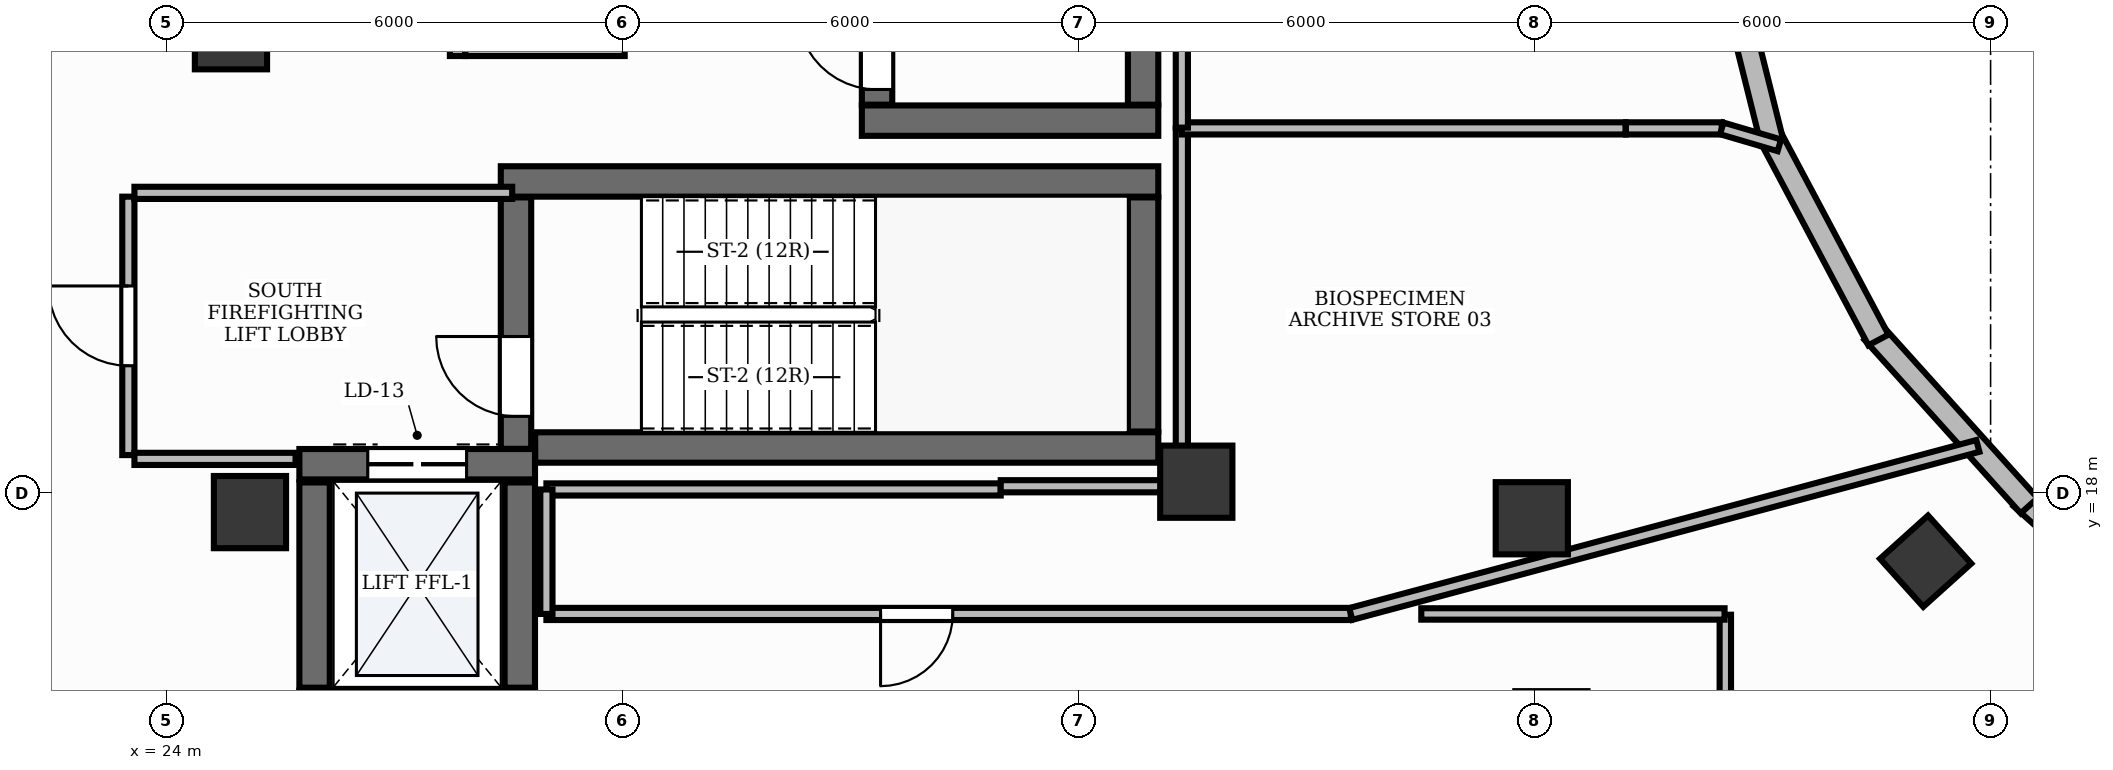
"""IFC4 building model, lengths in metres.
Left out: names, types, materials, properties, quantities, classifications, styles, units other than length and angle.
Written with IfcOpenShell. Run it as: python <this file> out.ifc"""

import sys

from ifc_helpers import new_model, si_unit, direction, frame, frame_2d, origin, origin_2d, place, context, subcontext, project, spatial, rectangle, extrude, element, fill, save


model = new_model("IFC4")
c1 = context("Model", 3, precision=1e-05, world=origin(), true_north=direction((0.0, 1.0)))
c2 = subcontext(c1, "Body", "Model", "MODEL_VIEW")
j1 = project(units=[si_unit("LENGTHUNIT", "METRE"), si_unit("PLANEANGLEUNIT", "RADIAN")], contexts=[c1])
p1 = place(None, origin())
s1 = spatial("IfcSite", under=j1, at=p1, CompositionType="ELEMENT")
p2 = place(p1, origin())
s2 = spatial("IfcBuilding", under=s1, at=p2, CompositionType="ELEMENT")
p3 = place(p2, frame((0.0, 0.0, 273.0)))
s3 = spatial("IfcBuildingStorey", under=s2, at=p3, CompositionType="ELEMENT", Elevation=273.0)
p4 = place(p3, frame((28.852, 18.6, 0.0), z_axis=(0.0, 0.0, 1.0), x_axis=(1.0, 0.0, 0.0)))
e1 = element("IfcWall", 1, at=p4, inside=s3, PredefinedType="SHEAR", context=c2, shape_type="SweptSolid", body=[
    extrude(rectangle(XDim=8.198, YDim=0.4, at=frame_2d((4.099, 0.0))), origin(), (0.0, 0.0, 1.0), 3.88),
])
p5 = place(p3, frame((28.4, 22.1, 0.0), z_axis=(0.0, 0.0, 1.0), x_axis=(1.0, 0.0, 0.0)))
e2 = element("IfcWall", 2, at=p5, inside=s3, PredefinedType="SHEAR", context=c2, shape_type="SweptSolid", body=[
    extrude(rectangle(XDim=8.65, YDim=0.4, at=frame_2d((4.325, 0.0))), origin(), (0.0, 0.0, 1.0), 3.88),
])
p6 = place(p3, frame((36.85, 18.81, 0.0), z_axis=(0.0, 0.0, 1.0), x_axis=(0.0, 1.0, 0.0)))
e3 = element("IfcWall", 3, at=p6, inside=s3, PredefinedType="SHEAR", context=c2, shape_type="SweptSolid", body=[
    extrude(rectangle(XDim=3.08, YDim=0.4, at=frame_2d((1.54, 0.0))), origin(), (0.0, 0.0, 1.0), 3.88),
])
p7 = place(p3, frame((28.6, 18.582, 0.0), z_axis=(0.0, 0.0, 1.0), x_axis=(0.0, 1.0, 0.0)))
e4 = element("IfcWall", 4, at=p7, inside=s3, PredefinedType="SHEAR", context=c2, shape_type="SweptSolid", body=[
    extrude(rectangle(XDim=3.308, YDim=0.4, at=frame_2d((1.654, 0.0))), origin(), (0.0, 0.0, 1.0), 3.88),
])
p8 = place(p7, frame((0.428, 0.0, 0.0)))
e5 = element("IfcOpeningElement", 5, at=p8, cuts=e4, PredefinedType="OPENING", context=c2, shape_type="SweptSolid", body=[
    extrude(rectangle(XDim=1.05, YDim=2.15, at=frame_2d((0.525, 1.075))), frame((0.0, 0.215, 0.0), z_axis=(0.0, -1.0, 0.0), x_axis=(1.0, 0.0, 0.0)), (0.0, 0.0, 1.0), 0.43),
])
p9 = place(p3, frame((33.15, 22.9, 0.0), z_axis=(0.0, 0.0, 1.0), x_axis=(1.0, 0.0, 0.0)))
e6 = element("IfcWall", 6, at=p9, inside=s3, PredefinedType="SHEAR", context=c2, shape_type="SweptSolid", body=[
    extrude(rectangle(XDim=3.9, YDim=0.4, at=frame_2d((1.95, 0.0))), origin(), (0.0, 0.0, 1.0), 3.88),
])
p10 = place(p3, frame((36.85, 23.11, 0.0), z_axis=(0.0, 0.0, 1.0), x_axis=(0.0, 1.0, 0.0)))
e7 = element("IfcWall", 7, at=p10, inside=s3, PredefinedType="SHEAR", context=c2, shape_type="SweptSolid", body=[
    extrude(rectangle(XDim=7.78, YDim=0.4, at=frame_2d((3.89, 0.0))), origin(), (0.0, 0.0, 1.0), 3.88),
])
p11 = place(p3, frame((33.35, 23.11, 0.0), z_axis=(0.0, 0.0, 1.0), x_axis=(0.0, 1.0, 0.0)))
e8 = element("IfcWall", 8, at=p11, inside=s3, PredefinedType="SHEAR", context=c2, shape_type="SweptSolid", body=[
    extrude(rectangle(XDim=7.78, YDim=0.4, at=frame_2d((3.89, 0.0))), origin(), (0.0, 0.0, 1.0), 3.88),
])
p12 = place(p11, frame((0.2, 0.0, 0.0)))
e9 = element("IfcOpeningElement", 9, at=p12, cuts=e8, PredefinedType="OPENING", context=c2, shape_type="SweptSolid", body=[
    extrude(rectangle(XDim=1.05, YDim=2.15, at=frame_2d((0.525, 1.075))), frame((0.0, 0.215, 0.0), z_axis=(0.0, -1.0, 0.0), x_axis=(1.0, 0.0, 0.0)), (0.0, 0.0, 1.0), 0.43),
])
p13 = place(p3, frame((25.75, 18.38, 0.0), z_axis=(0.0, 0.0, 1.0), x_axis=(1.0, 0.0, 0.0)))
e10 = element("IfcWall", 10, at=p13, inside=s3, PredefinedType="SHEAR", context=c2, shape_type="SweptSolid", body=[
    extrude(rectangle(XDim=3.1, YDim=0.4, at=frame_2d((1.55, 0.0))), origin(), (0.0, 0.0, 1.0), 3.88),
])
p14 = place(p13, frame((0.9, 0.0, 0.0)))
e11 = element("IfcOpeningElement", 11, at=p14, cuts=e10, PredefinedType="OPENING", context=c2, shape_type="SweptSolid", body=[
    extrude(rectangle(XDim=1.3, YDim=2.2, at=frame_2d((0.65, 1.1))), frame((0.0, 0.215, 0.0), z_axis=(0.0, -1.0, 0.0), x_axis=(1.0, 0.0, 0.0)), (0.0, 0.0, 1.0), 0.43),
])
for number, where, z_axis, x_axis in (
    (12, (25.95, 15.44, 0.0), (0.0, 0.0, 1.0), (0.0, 1.0, 0.0)),
    (13, (28.65, 15.44, 0.0), (0.0, 0.0, 1.0), (0.0, 1.0, 0.0)),
):
    element("IfcWall", number, at=place(p3, frame(where, z_axis=z_axis, x_axis=x_axis)), inside=s3, PredefinedType="SHEAR", context=c2, shape_type="SweptSolid", body=[
        extrude(rectangle(XDim=2.7, YDim=0.4, at=frame_2d((1.35, 0.0))), origin(), (0.0, 0.0, 1.0), 3.88),
    ])
for number, where, z_axis, x_axis in (
    (14, (24.85, 24.05, -0.0), (0.0, 0.0, 1.0), (1.0, 0.0, 0.0)),
    (15, (25.1, 17.75, -0.0), (0.0, 0.0, 1.0), (1.0, 0.0, 0.0)),
    (16, (37.55, 18.15, -0.0), (0.0, 0.0, 1.0), (1.0, 0.0, 0.0)),
):
    element("IfcColumn", number, at=place(p3, frame(where, z_axis=z_axis, x_axis=x_axis)), inside=s3, PredefinedType="PILASTER", context=c2, shape_type="SweptSolid", body=[
        extrude(rectangle(XDim=0.95, YDim=0.95, at=origin_2d()), origin(), (0.0, 0.0, 1.0), 3.881),
    ])
p15 = place(p3, frame((47.146, 17.104, -0.0), z_axis=(0.0, 0.0, 1.0), x_axis=(-0.669130606359, 0.743144825477, 0.0)))
e17 = element("IfcColumn", 17, at=p15, inside=s3, PredefinedType="COLUMN", context=c2, shape_type="SweptSolid", body=[
    extrude(rectangle(XDim=0.85, YDim=0.85, at=origin_2d()), origin(), (0.0, 0.0, 1.0), 3.881),
])
p16 = place(p3, frame((41.964, 17.669, -0.0), z_axis=(0.0, 0.0, 1.0), x_axis=(1.0, 0.0, 0.0)))
e18 = element("IfcColumn", 18, at=p16, inside=s3, PredefinedType="COLUMN", context=c2, shape_type="SweptSolid", body=[
    extrude(rectangle(XDim=0.95, YDim=0.95, at=origin_2d()), origin(), (0.0, 0.0, 1.0), 3.881),
])
p17 = place(p3, frame((50.852, 15.736, 0.0), z_axis=(0.0, 0.0, 1.0), x_axis=(-0.743397410822, 0.668849975393, 0.0)))
e19 = element("IfcWall", 19, at=p17, inside=s3, PredefinedType="STANDARD", context=c2, shape_type="SweptSolid", body=[
    extrude(rectangle(XDim=3.291, YDim=0.3, at=frame_2d((1.646, 0.0))), origin(), (0.0, 0.0, 1.0), 3.88),
])
p18 = place(p3, frame((48.508, 17.835, 0.0), z_axis=(0.0, 0.0, 1.0), x_axis=(-0.669127242861, 0.743147853971, 0.0)))
e20 = element("IfcWall", 20, at=p18, inside=s3, PredefinedType="STANDARD", context=c2, shape_type="SweptSolid", body=[
    extrude(rectangle(XDim=3.071, YDim=0.3, at=frame_2d((1.535, 0.0))), origin(), (0.0, 0.0, 1.0), 3.88),
])
p19 = place(p3, frame((46.524, 20.014, 0.0), z_axis=(0.0, 0.0, 1.0), x_axis=(-0.469494296004, 0.882935505017, 0.0)))
e21 = element("IfcWall", 21, at=p19, inside=s3, PredefinedType="STANDARD", context=c2, shape_type="SweptSolid", body=[
    extrude(rectangle(XDim=3.071, YDim=0.3, at=frame_2d((1.535, 0.0))), origin(), (0.0, 0.0, 1.0), 3.88),
])
p20 = place(p3, frame((45.127, 22.609, 0.0), z_axis=(0.0, 0.0, 1.0), x_axis=(-0.241880750878, 0.970305983881, 0.0)))
e22 = element("IfcWall", 22, at=p20, inside=s3, PredefinedType="STANDARD", context=c2, shape_type="SweptSolid", body=[
    extrude(rectangle(XDim=3.07, YDim=0.3, at=frame_2d((1.535, 0.0))), origin(), (0.0, 0.0, 1.0), 3.88),
])
p21 = place(p3, frame((27.83, 23.75, 0.0), z_axis=(0.0, 0.0, 1.0), x_axis=(0.0, 1.0, 0.0)))
e23 = element("IfcWall", 23, at=p21, inside=s3, PredefinedType="PARTITIONING", context=c2, shape_type="SweptSolid", body=[
    extrude(rectangle(XDim=1.366, YDim=0.2, at=frame_2d((0.683, 0.0))), origin(), (0.0, 0.0, 1.0), 2.89),
])
p22 = place(p3, frame((27.934, 23.85, 0.0), z_axis=(0.0, 0.0, 1.0), x_axis=(1.0, 0.0, 0.0)))
e24 = element("IfcWall", 24, at=p22, inside=s3, PredefinedType="PARTITIONING", context=c2, shape_type="SweptSolid", body=[
    extrude(rectangle(XDim=2.096, YDim=0.2, at=frame_2d((1.048, 0.0))), origin(), (0.0, 0.0, 1.0), 2.89),
])
p23 = place(p3, frame((23.5, 18.5, 0.0), z_axis=(0.0, 0.0, 1.0), x_axis=(0.0, 1.0, 0.0)))
e25 = element("IfcWall", 25, at=p23, inside=s3, PredefinedType="PARTITIONING", context=c2, shape_type="SweptSolid", body=[
    extrude(rectangle(XDim=3.4, YDim=0.16, at=frame_2d((1.7, 0.0))), origin(), (0.0, 0.0, 1.0), 2.89),
])
p24 = place(p23, frame((1.175, 0.0, 0.0)))
e26 = element("IfcOpeningElement", 26, at=p24, cuts=e25, PredefinedType="OPENING", context=c2, shape_type="SweptSolid", body=[
    extrude(rectangle(XDim=1.05, YDim=2.15, at=frame_2d((0.525, 1.075))), frame((0.0, 0.095, 0.0), z_axis=(0.0, -1.0, 0.0), x_axis=(1.0, 0.0, 0.0)), (0.0, 0.0, 1.0), 0.19),
])
p25 = place(p3, frame((23.58, 21.95, 0.0), z_axis=(0.0, 0.0, 1.0), x_axis=(1.0, 0.0, 0.0)))
e27 = element("IfcWall", 27, at=p25, inside=s3, PredefinedType="PARTITIONING", context=c2, shape_type="SweptSolid", body=[
    extrude(rectangle(XDim=4.97, YDim=0.16, at=frame_2d((2.485, 0.0))), origin(), (0.0, 0.0, 1.0), 2.89),
])
p26 = place(p3, frame((23.58, 18.45, 0.0), z_axis=(0.0, 0.0, 1.0), x_axis=(1.0, 0.0, 0.0)))
e28 = element("IfcWall", 28, at=p26, inside=s3, PredefinedType="PARTITIONING", context=c2, shape_type="SweptSolid", body=[
    extrude(rectangle(XDim=2.12, YDim=0.16, at=frame_2d((1.06, 0.0))), origin(), (0.0, 0.0, 1.0), 2.89),
])
p27 = place(p3, frame((39.583, 16.41, 0.0), z_axis=(0.0, 0.0, 1.0), x_axis=(-1.0, 0.0, 0.0)))
e29 = element("IfcWall", 29, at=p27, inside=s3, PredefinedType="PARTITIONING", context=c2, shape_type="SweptSolid", body=[
    extrude(rectangle(XDim=10.583, YDim=0.16, at=frame_2d((5.292, 0.0))), origin(), (0.0, 0.0, 1.0), 2.89),
])
p28 = place(p27, frame((5.237, 0.0, 0.0)))
e30 = element("IfcOpeningElement", 30, at=p28, cuts=e29, PredefinedType="OPENING", context=c2, shape_type="SweptSolid", body=[
    extrude(rectangle(XDim=0.95, YDim=2.15, at=frame_2d((0.475, 1.075))), frame((0.0, 0.095, 0.0), z_axis=(0.0, -1.0, 0.0), x_axis=(1.0, 0.0, 0.0)), (0.0, 0.0, 1.0), 0.19),
])
p29 = place(p3, frame((44.51, 12.6, 0.0), z_axis=(0.0, 0.0, 1.0), x_axis=(0.0, 1.0, 0.0)))
e31 = element("IfcWall", 31, at=p29, inside=s3, PredefinedType="PARTITIONING", context=c2, shape_type="SweptSolid", body=[
    extrude(rectangle(XDim=3.8, YDim=0.15, at=frame_2d((1.9, 0.0))), origin(), (0.0, 0.0, 1.0), 2.89),
])
p30 = place(p29, frame((0.24, 0.0, 0.0)))
e32 = element("IfcOpeningElement", 32, at=p30, cuts=e31, PredefinedType="OPENING", context=c2, shape_type="SweptSolid", body=[
    extrude(rectangle(XDim=0.95, YDim=2.15, at=frame_2d((0.475, 1.075))), frame((0.0, 0.09, 0.0), z_axis=(0.0, -1.0, 0.0), x_axis=(1.0, 0.0, 0.0)), (0.0, 0.0, 1.0), 0.18),
])
p31 = place(p3, frame((29.0, 18.048, 0.0), z_axis=(0.0, 0.0, 1.0), x_axis=(1.0, 0.0, 0.0)))
e33 = element("IfcWall", 33, at=p31, inside=s3, PredefinedType="PARTITIONING", context=c2, shape_type="SweptSolid", body=[
    extrude(rectangle(XDim=5.977, YDim=0.16, at=frame_2d((2.988, 0.0))), origin(), (0.0, 0.0, 1.0), 2.89),
])
p32 = place(p3, frame((34.977, 18.09, 0.0), z_axis=(0.0, 0.0, 1.0), x_axis=(1.0, 0.0, 0.0)))
e34 = element("IfcWall", 34, at=p32, inside=s3, PredefinedType="PARTITIONING", context=c2, shape_type="SweptSolid", body=[
    extrude(rectangle(XDim=2.373, YDim=0.16, at=frame_2d((1.187, 0.0))), origin(), (0.0, 0.0, 1.0), 2.89),
])
p33 = place(p3, frame((37.36, 18.1, 0.0), z_axis=(0.0, 0.0, 1.0), x_axis=(0.0, 1.0, 0.0)))
e35 = element("IfcWall", 35, at=p33, inside=s3, PredefinedType="PARTITIONING", context=c2, shape_type="SweptSolid", body=[
    extrude(rectangle(XDim=4.698, YDim=0.16, at=frame_2d((2.349, 0.0))), origin(), (0.0, 0.0, 1.0), 2.89),
])
p34 = place(p3, frame((37.36, 22.798, 0.0), z_axis=(0.0, 0.0, 1.0), x_axis=(1.0, 0.0, 0.0)))
e36 = element("IfcWall", 36, at=p34, inside=s3, PredefinedType="PARTITIONING", context=c2, shape_type="SweptSolid", body=[
    extrude(rectangle(XDim=5.838, YDim=0.16, at=frame_2d((2.919, 0.0))), origin(), (0.0, 0.0, 1.0), 2.89),
])
p35 = place(p3, frame((43.202, 22.798, 0.0), z_axis=(0.0, 0.0, 1.0), x_axis=(1.0, 0.0, 0.0)))
e37 = element("IfcWall", 37, at=p35, inside=s3, PredefinedType="PARTITIONING", context=c2, shape_type="SweptSolid", body=[
    extrude(rectangle(XDim=1.261, YDim=0.16, at=frame_2d((0.63, 0.0))), origin(), (0.0, 0.0, 1.0), 2.89),
])
p36 = place(p3, frame((44.463, 22.798, 0.0), z_axis=(0.0, 0.0, 1.0), x_axis=(0.959419641558, -0.281982182759, 0.0)))
e38 = element("IfcWall", 38, at=p36, inside=s3, PredefinedType="PARTITIONING", context=c2, shape_type="SweptSolid", body=[
    extrude(rectangle(XDim=0.79, YDim=0.16, at=frame_2d((0.395, 0.0))), origin(), (0.0, 0.0, 1.0), 2.89),
])
p37 = place(p3, frame((47.832, 18.62, 0.0), z_axis=(0.0, 0.0, 1.0), x_axis=(-0.965923934259, -0.258826106152, 0.0)))
e39 = element("IfcWall", 39, at=p37, inside=s3, PredefinedType="PARTITIONING", context=c2, shape_type="SweptSolid", body=[
    extrude(rectangle(XDim=8.54, YDim=0.16, at=frame_2d((4.27, 0.0))), origin(), (0.0, 0.0, 1.0), 2.89),
])
p38 = place(p3, frame((29.0, 16.41, 0.0), z_axis=(0.0, 0.0, 1.0), x_axis=(0.0, 1.0, 0.0)))
e40 = element("IfcWall", 40, at=p38, inside=s3, PredefinedType="PARTITIONING", context=c2, shape_type="SweptSolid", body=[
    extrude(rectangle(XDim=1.638, YDim=0.16, at=frame_2d((0.819, 0.0))), origin(), (0.0, 0.0, 1.0), 2.89),
])
p39 = place(p3, frame((44.5, 16.41, 0.0), z_axis=(0.0, 0.0, 1.0), x_axis=(-1.0, 0.0, 0.0)))
e41 = element("IfcWall", 41, at=p39, inside=s3, PredefinedType="PARTITIONING", context=c2, shape_type="SweptSolid", body=[
    extrude(rectangle(XDim=3.99, YDim=0.15, at=frame_2d((1.995, 0.0))), origin(), (0.0, 0.0, 1.0), 2.89),
])
p40 = place(p3, frame((37.36, 22.808, 0.0), z_axis=(0.0, 0.0, 1.0), x_axis=(0.0, 1.0, 0.0)))
e42 = element("IfcWall", 42, at=p40, inside=s3, PredefinedType="PARTITIONING", context=c2, shape_type="SweptSolid", body=[
    extrude(rectangle(XDim=13.092, YDim=0.16, at=frame_2d((6.546, 0.0))), origin(), (0.0, 0.0, 1.0), 2.89),
])
p41 = place(p8, origin())
e43 = element("IfcDoor", 43, at=p41, inside=s3, OperationType="SINGLE_SWING_RIGHT", PredefinedType="DOOR", context=c2, shape_type="SweptSolid", body=[
    extrude(rectangle(XDim=1.05, YDim=2.15, at=frame_2d((0.525, 1.075))), frame((0.0, 0.025, 0.0), z_axis=(0.0, -1.0, 0.0), x_axis=(1.0, 0.0, 0.0)), (0.0, 0.0, 1.0), 0.05),
])
fill(e5, e43)
p42 = place(p12, origin())
e44 = element("IfcDoor", 44, at=p42, inside=s3, OperationType="SINGLE_SWING_RIGHT", PredefinedType="DOOR", context=c2, shape_type="SweptSolid", body=[
    extrude(rectangle(XDim=1.05, YDim=2.15, at=frame_2d((0.525, 1.075))), frame((0.0, 0.025, 0.0), z_axis=(0.0, -1.0, 0.0), x_axis=(1.0, 0.0, 0.0)), (0.0, 0.0, 1.0), 0.05),
])
fill(e9, e44)
p43 = place(p14, origin())
e45 = element("IfcDoor", 45, at=p43, inside=s3, OperationType="DOUBLE_DOOR_SLIDING", PredefinedType="DOOR", context=c2, shape_type="SweptSolid", body=[
    extrude(rectangle(XDim=1.3, YDim=2.2, at=frame_2d((0.65, 1.1))), frame((0.0, 0.025, 0.0), z_axis=(0.0, -1.0, 0.0), x_axis=(1.0, 0.0, 0.0)), (0.0, 0.0, 1.0), 0.05),
])
fill(e11, e45)
p44 = place(p24, origin())
e46 = element("IfcDoor", 46, at=p44, inside=s3, OperationType="SINGLE_SWING_RIGHT", PredefinedType="DOOR", context=c2, shape_type="SweptSolid", body=[
    extrude(rectangle(XDim=1.05, YDim=2.15, at=frame_2d((0.525, 1.075))), frame((0.0, 0.025, 0.0), z_axis=(0.0, -1.0, 0.0), x_axis=(1.0, 0.0, 0.0)), (0.0, 0.0, 1.0), 0.05),
])
fill(e26, e46)
p45 = place(p28, origin())
e47 = element("IfcDoor", 47, at=p45, inside=s3, OperationType="SINGLE_SWING_RIGHT", PredefinedType="DOOR", context=c2, shape_type="SweptSolid", body=[
    extrude(rectangle(XDim=0.95, YDim=2.15, at=frame_2d((0.475, 1.075))), frame((0.0, 0.025, 0.0), z_axis=(0.0, -1.0, 0.0), x_axis=(1.0, 0.0, 0.0)), (0.0, 0.0, 1.0), 0.05),
])
fill(e30, e47)
save(model, sys.argv[1])
